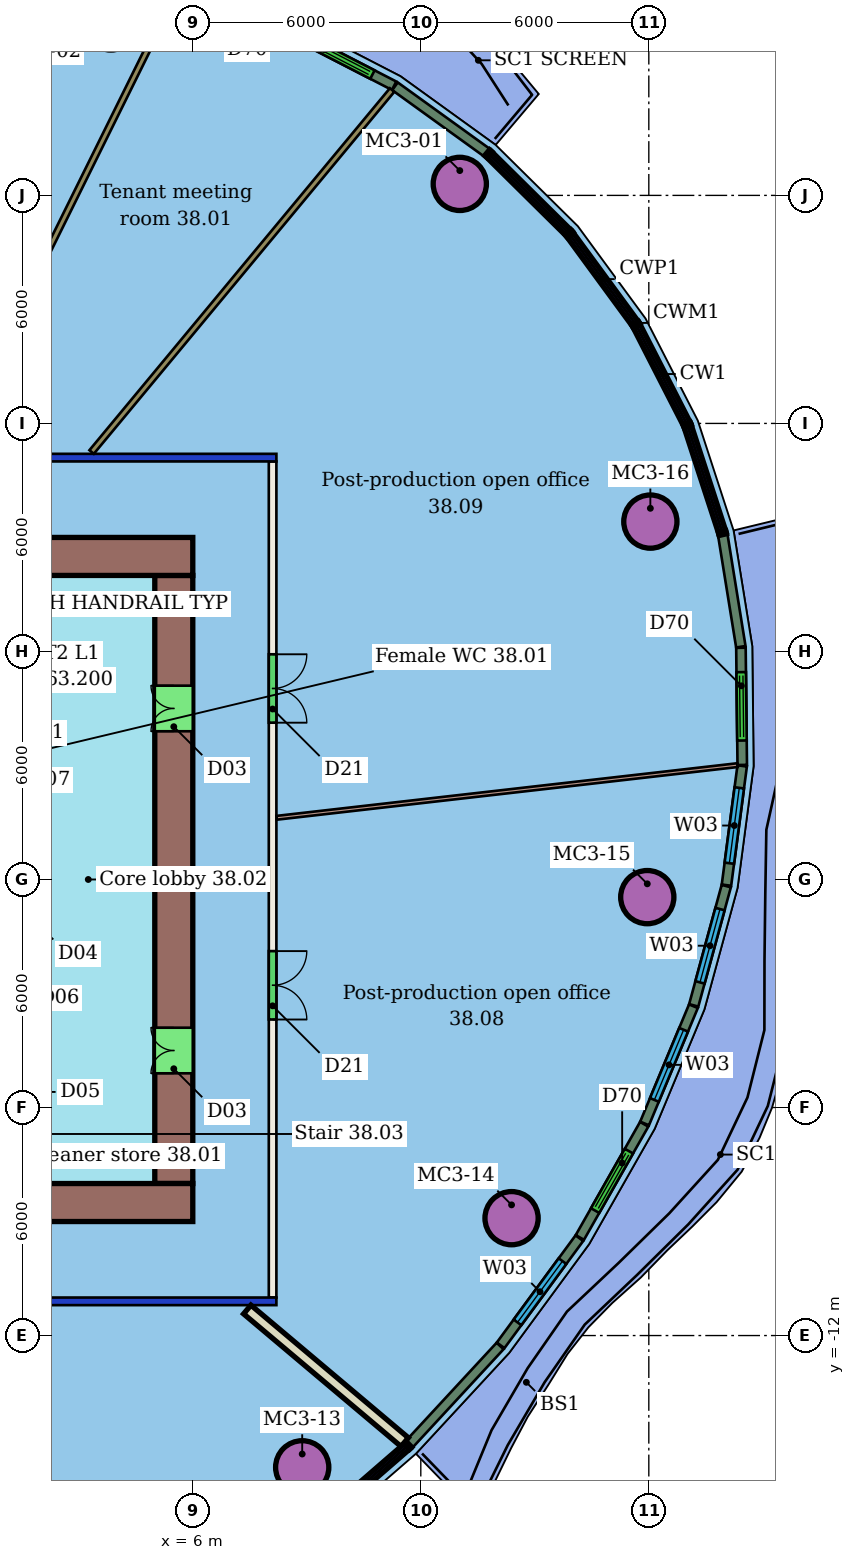
"""IFC4 building model, lengths in metres.
Left out: names, types, materials, properties, quantities, classifications, styles, units other than length and angle.
Written with IfcOpenShell. Run it as: python <this file> out.ifc"""

import sys

from ifc_helpers import new_model, si_unit, direction, frame, frame_2d, origin, origin_2d, place, context, subcontext, project, spatial, rectangle, hollow_circle, extrude, element, fill, save


model = new_model("IFC4")
c1 = context("Model", 3, precision=1e-05, world=origin(), true_north=direction((0.0, 1.0)))
c2 = subcontext(c1, "Body", "Model", "MODEL_VIEW")
j1 = project(units=[si_unit("LENGTHUNIT", "METRE"), si_unit("PLANEANGLEUNIT", "RADIAN")], contexts=[c1])
p1 = place(None, origin())
s1 = spatial("IfcSite", under=j1, at=p1, CompositionType="ELEMENT")
p2 = place(p1, origin())
s2 = spatial("IfcBuilding", under=s1, at=p2, CompositionType="ELEMENT")
p3 = place(p2, frame((0.0, 0.0, 161.4)))
s3 = spatial("IfcBuildingStorey", under=s2, at=p3, CompositionType="ELEMENT", Elevation=161.4)
for number, where, z_axis, x_axis in (
    (1, (13.026, 18.303, 0.0), (0.0, 0.0, 1.0), (1.0, 0.0, 0.0)),
    (2, (8.879, -15.467, 0.0), (0.0, 0.0, 1.0), (1.0, 0.0, 0.0)),
    (3, (14.388, -8.912, 0.0), (0.0, 0.0, 1.0), (1.0, 0.0, 0.0)),
    (4, (17.959, -0.464, 0.0), (0.0, 0.0, 1.0), (1.0, 0.0, 0.0)),
    (5, (18.041, 9.417, 0.0), (0.0, 0.0, 1.0), (1.0, 0.0, 0.0)),
):
    element("IfcColumn", number, at=place(p3, frame(where, z_axis=z_axis, x_axis=x_axis)), inside=s3, PredefinedType="COLUMN", context=c2, shape_type="SweptSolid", body=[
        extrude(hollow_circle(Radius=0.7, WallThickness=0.05, at=origin_2d()), origin(), (0.0, 0.0, 1.0), 3.45),
    ])
p4 = place(p3, frame((8.2, -11.1, 0.0), z_axis=(0.0, 0.0, 1.0), x_axis=(-1.0, 0.0, 0.0)))
e6 = element("IfcWall", 6, at=p4, inside=s3, PredefinedType="PARTITIONING", context=c2, shape_type="SweptSolid", body=[
    extrude(rectangle(XDim=28.4, YDim=0.2, at=frame_2d((14.2, 0.0))), origin(), (0.0, 0.0, 1.0), 3.05),
])
p5 = place(p4, frame((24.868, 0.0, 0.0)))
e7 = element("IfcOpeningElement", 7, at=p5, cuts=e6, PredefinedType="OPENING", context=c2, shape_type="SweptSolid", body=[
    extrude(rectangle(XDim=1.0, YDim=2.1, at=frame_2d((0.5, 1.05))), frame((0.0, 0.11, 0.0), z_axis=(0.0, -1.0, 0.0), x_axis=(1.0, 0.0, 0.0)), (0.0, 0.0, 1.0), 0.22),
])
p6 = place(p4, frame((18.971, 0.0, 0.0)))
e8 = element("IfcOpeningElement", 8, at=p6, cuts=e6, PredefinedType="OPENING", context=c2, shape_type="SweptSolid", body=[
    extrude(rectangle(XDim=1.8, YDim=2.4, at=frame_2d((0.9, 1.2))), frame((0.0, 0.11, 0.0), z_axis=(0.0, -1.0, 0.0), x_axis=(1.0, 0.0, 0.0)), (0.0, 0.0, 1.0), 0.22),
])
p7 = place(p4, frame((8.524, 0.0, 0.0)))
e9 = element("IfcOpeningElement", 9, at=p7, cuts=e6, PredefinedType="OPENING", context=c2, shape_type="SweptSolid", body=[
    extrude(rectangle(XDim=1.2, YDim=2.1, at=frame_2d((0.6, 1.05))), frame((0.0, 0.11, 0.0), z_axis=(0.0, -1.0, 0.0), x_axis=(1.0, 0.0, 0.0)), (0.0, 0.0, 1.0), 0.22),
])
p8 = place(p3, frame((-20.2, 11.1, 0.0), z_axis=(0.0, 0.0, 1.0), x_axis=(1.0, 0.0, 0.0)))
e10 = element("IfcWall", 10, at=p8, inside=s3, PredefinedType="PARTITIONING", context=c2, shape_type="SweptSolid", body=[
    extrude(rectangle(XDim=28.4, YDim=0.2, at=frame_2d((14.2, 0.0))), origin(), (0.0, 0.0, 1.0), 3.05),
])
p9 = place(p8, frame((20.771, 0.0, 0.0)))
e11 = element("IfcOpeningElement", 11, at=p9, cuts=e10, PredefinedType="OPENING", context=c2, shape_type="SweptSolid", body=[
    extrude(rectangle(XDim=0.9, YDim=2.1, at=frame_2d((0.45, 1.05))), frame((0.0, 0.11, 0.0), z_axis=(0.0, -1.0, 0.0), x_axis=(1.0, 0.0, 0.0)), (0.0, 0.0, 1.0), 0.22),
])
p10 = place(p8, frame((14.548, 0.0, 0.0)))
e12 = element("IfcOpeningElement", 12, at=p10, cuts=e10, PredefinedType="OPENING", context=c2, shape_type="SweptSolid", body=[
    extrude(rectangle(XDim=1.8, YDim=2.1, at=frame_2d((0.9, 1.05))), frame((0.0, 0.11, 0.0), z_axis=(0.0, -1.0, 0.0), x_axis=(1.0, 0.0, 0.0)), (0.0, 0.0, 1.0), 0.22),
])
p11 = place(p3, frame((8.1, 11.0, 0.0), z_axis=(0.0, 0.0, 1.0), x_axis=(0.0, -1.0, 0.0)))
e13 = element("IfcWall", 13, at=p11, inside=s3, PredefinedType="PARTITIONING", context=c2, shape_type="SweptSolid", body=[
    extrude(rectangle(XDim=22.0, YDim=0.2, at=frame_2d((11.0, 0.0))), origin(), (0.0, 0.0, 1.0), 3.45),
])
p12 = place(p11, frame((12.884, 0.0, 0.0)))
e14 = element("IfcOpeningElement", 14, at=p12, cuts=e13, PredefinedType="OPENING", context=c2, shape_type="SweptSolid", body=[
    extrude(rectangle(XDim=1.8, YDim=2.1, at=frame_2d((0.9, 1.05))), frame((0.0, 0.11, 0.0), z_axis=(0.0, -1.0, 0.0), x_axis=(1.0, 0.0, 0.0)), (0.0, 0.0, 1.0), 0.22),
])
p13 = place(p11, frame((5.074, 0.0, 0.0)))
e15 = element("IfcOpeningElement", 15, at=p13, cuts=e13, PredefinedType="OPENING", context=c2, shape_type="SweptSolid", body=[
    extrude(rectangle(XDim=1.8, YDim=2.1, at=frame_2d((0.9, 1.05))), frame((0.0, 0.11, 0.0), z_axis=(0.0, -1.0, 0.0), x_axis=(1.0, 0.0, 0.0)), (0.0, 0.0, 1.0), 0.22),
])
p14 = place(p3, frame((11.244, 20.772, 0.0), z_axis=(0.0, 0.0, 1.0), x_axis=(-0.638730261961, -0.769430732721, 0.0)))
e16 = element("IfcWall", 16, at=p14, inside=s3, PredefinedType="PARTITIONING", context=c2, shape_type="SweptSolid", body=[
    extrude(rectangle(XDim=12.379, YDim=0.15, at=frame_2d((6.189, 0.0))), origin(), (0.0, 0.0, 1.0), 3.45),
])
p15 = place(p3, frame((5.499, 23.229, 0.0), z_axis=(0.0, 0.0, 1.0), x_axis=(-0.443656871775, -0.896196730705, 0.0)))
e17 = element("IfcWall", 17, at=p15, inside=s3, PredefinedType="PARTITIONING", context=c2, shape_type="SweptSolid", body=[
    extrude(rectangle(XDim=13.385, YDim=0.15, at=frame_2d((6.692, 0.0))), origin(), (0.0, 0.0, 1.0), 3.45),
])
p16 = place(p3, frame((11.576, -14.804, 0.0), z_axis=(0.0, 0.0, 1.0), x_axis=(-0.764841059906, 0.644219025706, 0.0)))
e18 = element("IfcWall", 18, at=p16, inside=s3, PredefinedType="PARTITIONING", context=c2, shape_type="SweptSolid", body=[
    extrude(rectangle(XDim=5.416, YDim=0.3, at=frame_2d((2.708, 0.0))), origin(), (0.0, 0.0, 1.0), 3.45),
])
p17 = place(p3, frame((20.334, 3.009, 0.0), z_axis=(0.0, 0.0, 1.0), x_axis=(-0.993535766553, -0.113519516294, 0.0)))
e19 = element("IfcWall", 19, at=p17, inside=s3, PredefinedType="PARTITIONING", context=c2, shape_type="SweptSolid", body=[
    extrude(rectangle(XDim=12.207, YDim=0.1, at=frame_2d((6.104, 0.0))), origin(), (0.0, 0.0, 1.0), 3.45),
])
p18 = place(p3, frame((13.732, 19.131, 0.0), z_axis=(0.0, 0.0, 1.0), x_axis=(-0.810861050922, 0.58523871719, 0.0)))
e20 = element("IfcWall", 20, at=p18, inside=s3, PredefinedType="SOLIDWALL", context=c2, shape_type="SweptSolid", body=[
    extrude(rectangle(XDim=2.974, YDim=0.25, at=frame_2d((1.487, 0.0))), origin(), (0.0, 0.0, 1.0), 3.1),
])
p19 = place(p3, frame((11.298, 20.885, 0.0), z_axis=(0.0, 0.0, 1.0), x_axis=(-0.88878300735, 0.458328229378, 0.0)))
e21 = element("IfcWall", 21, at=p19, inside=s3, PredefinedType="SOLIDWALL", context=c2, shape_type="SweptSolid", body=[
    extrude(rectangle(XDim=3.083, YDim=0.25, at=frame_2d((1.542, 0.0))), origin(), (0.0, 0.0, 1.0), 3.1),
])
p20 = place(p19, frame((0.642, 0.0, 0.0)))
e22 = element("IfcOpeningElement", 22, at=p20, cuts=e21, PredefinedType="OPENING", context=c2, shape_type="SweptSolid", body=[
    extrude(rectangle(XDim=1.8, YDim=2.4, at=frame_2d((0.9, 1.2))), frame((0.0, 0.135, 0.0), z_axis=(0.0, -1.0, 0.0), x_axis=(1.0, 0.0, 0.0)), (0.0, 0.0, 1.0), 0.27),
])
p21 = place(p3, frame((11.7, -14.854, 0.0), z_axis=(0.0, 0.0, 1.0), x_axis=(0.679128099516, 0.734019771156, 0.0)))
e23 = element("IfcWall", 23, at=p21, inside=s3, PredefinedType="SOLIDWALL", context=c2, shape_type="SweptSolid", body=[
    extrude(rectangle(XDim=3.514, YDim=0.25, at=frame_2d((1.757, 0.0))), origin(), (0.0, 0.0, 1.0), 3.1),
])
p22 = place(p3, frame((14.101, -12.257, 0.0), z_axis=(0.0, 0.0, 1.0), x_axis=(0.592246582395, 0.805756778216, 0.0)))
e24 = element("IfcWall", 24, at=p22, inside=s3, PredefinedType="SOLIDWALL", context=c2, shape_type="SweptSolid", body=[
    extrude(rectangle(XDim=3.499, YDim=0.25, at=frame_2d((1.75, 0.0))), origin(), (0.0, 0.0, 1.0), 3.1),
])
p23 = place(p22, frame((0.75, 0.0, 0.9)))
e25 = element("IfcOpeningElement", 25, at=p23, cuts=e24, PredefinedType="OPENING", context=c2, shape_type="SweptSolid", body=[
    extrude(rectangle(XDim=2.0, YDim=2.1, at=frame_2d((1.0, 1.05))), frame((0.0, 0.135, 0.0), z_axis=(0.0, -1.0, 0.0), x_axis=(1.0, 0.0, 0.0)), (0.0, 0.0, 1.0), 0.27),
])
p24 = place(p3, frame((16.185, -9.419, 0.0), z_axis=(0.0, 0.0, 1.0), x_axis=(0.494211413801, 0.869341750101, 0.0)))
e26 = element("IfcWall", 26, at=p24, inside=s3, PredefinedType="SOLIDWALL", context=c2, shape_type="SweptSolid", body=[
    extrude(rectangle(XDim=3.426, YDim=0.25, at=frame_2d((1.713, 0.0))), origin(), (0.0, 0.0, 1.0), 3.1),
])
p25 = place(p24, frame((0.813, 0.0, 0.0)))
e27 = element("IfcOpeningElement", 27, at=p25, cuts=e26, PredefinedType="OPENING", context=c2, shape_type="SweptSolid", body=[
    extrude(rectangle(XDim=1.8, YDim=2.4, at=frame_2d((0.9, 1.2))), frame((0.0, 0.135, 0.0), z_axis=(0.0, -1.0, 0.0), x_axis=(1.0, 0.0, 0.0)), (0.0, 0.0, 1.0), 0.27),
])
p26 = place(p3, frame((17.888, -6.42, 0.0), z_axis=(0.0, 0.0, 1.0), x_axis=(0.38458945082, 0.923087728397, 0.0)))
e28 = element("IfcWall", 28, at=p26, inside=s3, PredefinedType="SOLIDWALL", context=c2, shape_type="SweptSolid", body=[
    extrude(rectangle(XDim=3.342, YDim=0.25, at=frame_2d((1.671, 0.0))), origin(), (0.0, 0.0, 1.0), 3.1),
])
p27 = place(p26, frame((0.671, 0.0, 0.9)))
e29 = element("IfcOpeningElement", 29, at=p27, cuts=e28, PredefinedType="OPENING", context=c2, shape_type="SweptSolid", body=[
    extrude(rectangle(XDim=2.0, YDim=2.1, at=frame_2d((1.0, 1.05))), frame((0.0, 0.135, 0.0), z_axis=(0.0, -1.0, 0.0), x_axis=(1.0, 0.0, 0.0)), (0.0, 0.0, 1.0), 0.27),
])
p28 = place(p3, frame((19.182, -3.312, 0.0), z_axis=(0.0, 0.0, 1.0), x_axis=(0.263263454996, 0.964723977759, 0.0)))
e30 = element("IfcWall", 30, at=p28, inside=s3, PredefinedType="SOLIDWALL", context=c2, shape_type="SweptSolid", body=[
    extrude(rectangle(XDim=3.253, YDim=0.25, at=frame_2d((1.626, 0.0))), origin(), (0.0, 0.0, 1.0), 3.1),
])
p29 = place(p28, frame((0.626, 0.0, 0.9)))
e31 = element("IfcOpeningElement", 31, at=p29, cuts=e30, PredefinedType="OPENING", context=c2, shape_type="SweptSolid", body=[
    extrude(rectangle(XDim=2.0, YDim=2.1, at=frame_2d((1.0, 1.05))), frame((0.0, 0.135, 0.0), z_axis=(0.0, -1.0, 0.0), x_axis=(1.0, 0.0, 0.0)), (0.0, 0.0, 1.0), 0.27),
])
p30 = place(p3, frame((20.043, -0.149, 0.0), z_axis=(0.0, 0.0, 1.0), x_axis=(0.13076382866, 0.991413546969, 0.0)))
e32 = element("IfcWall", 32, at=p30, inside=s3, PredefinedType="SOLIDWALL", context=c2, shape_type="SweptSolid", body=[
    extrude(rectangle(XDim=3.165, YDim=0.25, at=frame_2d((1.582, 0.0))), origin(), (0.0, 0.0, 1.0), 3.1),
])
p31 = place(p30, frame((0.582, 0.0, 0.9)))
e33 = element("IfcOpeningElement", 33, at=p31, cuts=e32, PredefinedType="OPENING", context=c2, shape_type="SweptSolid", body=[
    extrude(rectangle(XDim=2.0, YDim=2.1, at=frame_2d((1.0, 1.05))), frame((0.0, 0.135, 0.0), z_axis=(0.0, -1.0, 0.0), x_axis=(1.0, 0.0, 0.0)), (0.0, 0.0, 1.0), 0.27),
])
p32 = place(p3, frame((20.458, 3.014, 0.0), z_axis=(0.0, 0.0, 1.0), x_axis=(-0.011086671081, 0.999938540974, 0.0)))
e34 = element("IfcWall", 34, at=p32, inside=s3, PredefinedType="SOLIDWALL", context=c2, shape_type="SweptSolid", body=[
    extrude(rectangle(XDim=3.083, YDim=0.25, at=frame_2d((1.542, 0.0))), origin(), (0.0, 0.0, 1.0), 3.1),
])
p33 = place(p32, frame((0.642, 0.0, 0.0)))
e35 = element("IfcOpeningElement", 35, at=p33, cuts=e34, PredefinedType="OPENING", context=c2, shape_type="SweptSolid", body=[
    extrude(rectangle(XDim=1.8, YDim=2.4, at=frame_2d((0.9, 1.2))), frame((0.0, 0.135, 0.0), z_axis=(0.0, -1.0, 0.0), x_axis=(1.0, 0.0, 0.0)), (0.0, 0.0, 1.0), 0.27),
])
p34 = place(p3, frame((20.422, 6.124, 0.0), z_axis=(0.0, 0.0, 1.0), x_axis=(-0.159444104464, 0.987206957812, 0.0)))
e36 = element("IfcWall", 36, at=p34, inside=s3, PredefinedType="SOLIDWALL", context=c2, shape_type="SweptSolid", body=[
    extrude(rectangle(XDim=2.974, YDim=0.25, at=frame_2d((1.487, 0.0))), origin(), (0.0, 0.0, 1.0), 3.1),
])
p35 = place(p3, frame((6.0, 8.5, 0.0), z_axis=(0.0, 0.0, 1.0), x_axis=(-1.0, 0.0, 0.0)))
e37 = element("IfcWall", 37, at=p35, inside=s3, PredefinedType="SHEAR", context=c2, shape_type="SweptSolid", body=[
    extrude(rectangle(XDim=12.0, YDim=1.0, at=frame_2d((6.0, 0.0))), origin(), (0.0, 0.0, 1.0), 3.3),
])
p36 = place(p35, frame((5.6, 0.0, 0.0)))
e38 = element("IfcOpeningElement", 38, at=p36, cuts=e37, PredefinedType="OPENING", context=c2, shape_type="SweptSolid", body=[
    extrude(rectangle(XDim=1.2, YDim=2.1, at=frame_2d((0.6, 1.05))), frame((0.0, 0.51, 0.0), z_axis=(0.0, -1.0, 0.0), x_axis=(1.0, 0.0, 0.0)), (0.0, 0.0, 1.0), 1.02),
])
p37 = place(p3, frame((-18.0, -8.5, 0.0), z_axis=(0.0, 0.0, 1.0), x_axis=(1.0, 0.0, 0.0)))
e39 = element("IfcWall", 39, at=p37, inside=s3, PredefinedType="SHEAR", context=c2, shape_type="SweptSolid", body=[
    extrude(rectangle(XDim=24.0, YDim=1.0, at=frame_2d((12.0, 0.0))), origin(), (0.0, 0.0, 1.0), 3.3),
])
p38 = place(p37, frame((6.0, 0.0, 0.0)))
e40 = element("IfcOpeningElement", 40, at=p38, cuts=e39, PredefinedType="OPENING", context=c2, shape_type="SweptSolid", body=[
    extrude(rectangle(XDim=1.2, YDim=2.1, at=frame_2d((0.6, 1.05))), frame((0.0, 0.51, 0.0), z_axis=(0.0, -1.0, 0.0), x_axis=(1.0, 0.0, 0.0)), (0.0, 0.0, 1.0), 1.02),
])
p39 = place(p3, frame((5.5, -8.0, 0.0), z_axis=(0.0, 0.0, 1.0), x_axis=(0.0, 1.0, 0.0)))
e41 = element("IfcWall", 41, at=p39, inside=s3, PredefinedType="SHEAR", context=c2, shape_type="SweptSolid", body=[
    extrude(rectangle(XDim=16.0, YDim=1.0, at=frame_2d((8.0, 0.0))), origin(), (0.0, 0.0, 1.0), 3.3),
])
p40 = place(p39, frame((2.9, 0.0, 0.0)))
e42 = element("IfcOpeningElement", 42, at=p40, cuts=e41, PredefinedType="OPENING", context=c2, shape_type="SweptSolid", body=[
    extrude(rectangle(XDim=1.2, YDim=2.1, at=frame_2d((0.6, 1.05))), frame((0.0, 0.51, 0.0), z_axis=(0.0, -1.0, 0.0), x_axis=(1.0, 0.0, 0.0)), (0.0, 0.0, 1.0), 1.02),
])
p41 = place(p39, frame((11.9, 0.0, 0.0)))
e43 = element("IfcOpeningElement", 43, at=p41, cuts=e41, PredefinedType="OPENING", context=c2, shape_type="SweptSolid", body=[
    extrude(rectangle(XDim=1.2, YDim=2.1, at=frame_2d((0.6, 1.05))), frame((0.0, 0.51, 0.0), z_axis=(0.0, -1.0, 0.0), x_axis=(1.0, 0.0, 0.0)), (0.0, 0.0, 1.0), 1.02),
])
p42 = place(p12, origin())
e44 = element("IfcDoor", 44, at=p42, inside=s3, OperationType="DOUBLE_DOOR_SINGLE_SWING", PredefinedType="DOOR", context=c2, shape_type="SweptSolid", body=[
    extrude(rectangle(XDim=1.8, YDim=2.1, at=frame_2d((0.9, 1.05))), frame((0.0, 0.025, 0.0), z_axis=(0.0, -1.0, 0.0), x_axis=(1.0, 0.0, 0.0)), (0.0, 0.0, 1.0), 0.05),
])
fill(e14, e44)
p43 = place(p13, origin())
e45 = element("IfcDoor", 45, at=p43, inside=s3, OperationType="DOUBLE_DOOR_SINGLE_SWING", PredefinedType="DOOR", context=c2, shape_type="SweptSolid", body=[
    extrude(rectangle(XDim=1.8, YDim=2.1, at=frame_2d((0.9, 1.05))), frame((0.0, 0.025, 0.0), z_axis=(0.0, -1.0, 0.0), x_axis=(1.0, 0.0, 0.0)), (0.0, 0.0, 1.0), 0.05),
])
fill(e15, e45)
p44 = place(p20, origin())
e46 = element("IfcDoor", 46, at=p44, inside=s3, OperationType="DOUBLE_DOOR_SLIDING", PredefinedType="DOOR", context=c2, shape_type="SweptSolid", body=[
    extrude(rectangle(XDim=1.8, YDim=2.4, at=frame_2d((0.9, 1.2))), frame((0.0, 0.025, 0.0), z_axis=(0.0, -1.0, 0.0), x_axis=(1.0, 0.0, 0.0)), (0.0, 0.0, 1.0), 0.05),
])
fill(e22, e46)
p45 = place(p23, origin())
e47 = element("IfcWindow", 47, at=p45, inside=s3, PartitioningType="SINGLE_PANEL", PredefinedType="WINDOW", context=c2, shape_type="SweptSolid", body=[
    extrude(rectangle(XDim=2.0, YDim=2.1, at=frame_2d((1.0, 1.05))), frame((0.0, 0.03, 0.0), z_axis=(0.0, -1.0, 0.0), x_axis=(1.0, 0.0, 0.0)), (0.0, 0.0, 1.0), 0.06),
])
fill(e25, e47)
p46 = place(p25, origin())
e48 = element("IfcDoor", 48, at=p46, inside=s3, OperationType="DOUBLE_DOOR_SLIDING", PredefinedType="DOOR", context=c2, shape_type="SweptSolid", body=[
    extrude(rectangle(XDim=1.8, YDim=2.4, at=frame_2d((0.9, 1.2))), frame((0.0, 0.025, 0.0), z_axis=(0.0, -1.0, 0.0), x_axis=(1.0, 0.0, 0.0)), (0.0, 0.0, 1.0), 0.05),
])
fill(e27, e48)
p47 = place(p27, origin())
e49 = element("IfcWindow", 49, at=p47, inside=s3, PartitioningType="SINGLE_PANEL", PredefinedType="WINDOW", context=c2, shape_type="SweptSolid", body=[
    extrude(rectangle(XDim=2.0, YDim=2.1, at=frame_2d((1.0, 1.05))), frame((0.0, 0.03, 0.0), z_axis=(0.0, -1.0, 0.0), x_axis=(1.0, 0.0, 0.0)), (0.0, 0.0, 1.0), 0.06),
])
fill(e29, e49)
p48 = place(p29, origin())
e50 = element("IfcWindow", 50, at=p48, inside=s3, PartitioningType="SINGLE_PANEL", PredefinedType="WINDOW", context=c2, shape_type="SweptSolid", body=[
    extrude(rectangle(XDim=2.0, YDim=2.1, at=frame_2d((1.0, 1.05))), frame((0.0, 0.03, 0.0), z_axis=(0.0, -1.0, 0.0), x_axis=(1.0, 0.0, 0.0)), (0.0, 0.0, 1.0), 0.06),
])
fill(e31, e50)
p49 = place(p31, origin())
e51 = element("IfcWindow", 51, at=p49, inside=s3, PartitioningType="SINGLE_PANEL", PredefinedType="WINDOW", context=c2, shape_type="SweptSolid", body=[
    extrude(rectangle(XDim=2.0, YDim=2.1, at=frame_2d((1.0, 1.05))), frame((0.0, 0.03, 0.0), z_axis=(0.0, -1.0, 0.0), x_axis=(1.0, 0.0, 0.0)), (0.0, 0.0, 1.0), 0.06),
])
fill(e33, e51)
p50 = place(p33, origin())
e52 = element("IfcDoor", 52, at=p50, inside=s3, OperationType="DOUBLE_DOOR_SLIDING", PredefinedType="DOOR", context=c2, shape_type="SweptSolid", body=[
    extrude(rectangle(XDim=1.8, YDim=2.4, at=frame_2d((0.9, 1.2))), frame((0.0, 0.025, 0.0), z_axis=(0.0, -1.0, 0.0), x_axis=(1.0, 0.0, 0.0)), (0.0, 0.0, 1.0), 0.05),
])
fill(e35, e52)
p51 = place(p40, origin())
e53 = element("IfcDoor", 53, at=p51, inside=s3, OperationType="DOUBLE_DOOR_SINGLE_SWING", PredefinedType="NOTDEFINED", context=c2, shape_type="SweptSolid", body=[
    extrude(rectangle(XDim=1.2, YDim=2.1, at=frame_2d((0.6, 1.05))), frame((0.0, 0.025, 0.0), z_axis=(0.0, -1.0, 0.0), x_axis=(1.0, 0.0, 0.0)), (0.0, 0.0, 1.0), 0.05),
])
fill(e42, e53)
p52 = place(p41, origin())
e54 = element("IfcDoor", 54, at=p52, inside=s3, OperationType="DOUBLE_DOOR_SINGLE_SWING", PredefinedType="NOTDEFINED", context=c2, shape_type="SweptSolid", body=[
    extrude(rectangle(XDim=1.2, YDim=2.1, at=frame_2d((0.6, 1.05))), frame((0.0, 0.025, 0.0), z_axis=(0.0, -1.0, 0.0), x_axis=(1.0, 0.0, 0.0)), (0.0, 0.0, 1.0), 0.05),
])
fill(e43, e54)
save(model, sys.argv[1])
